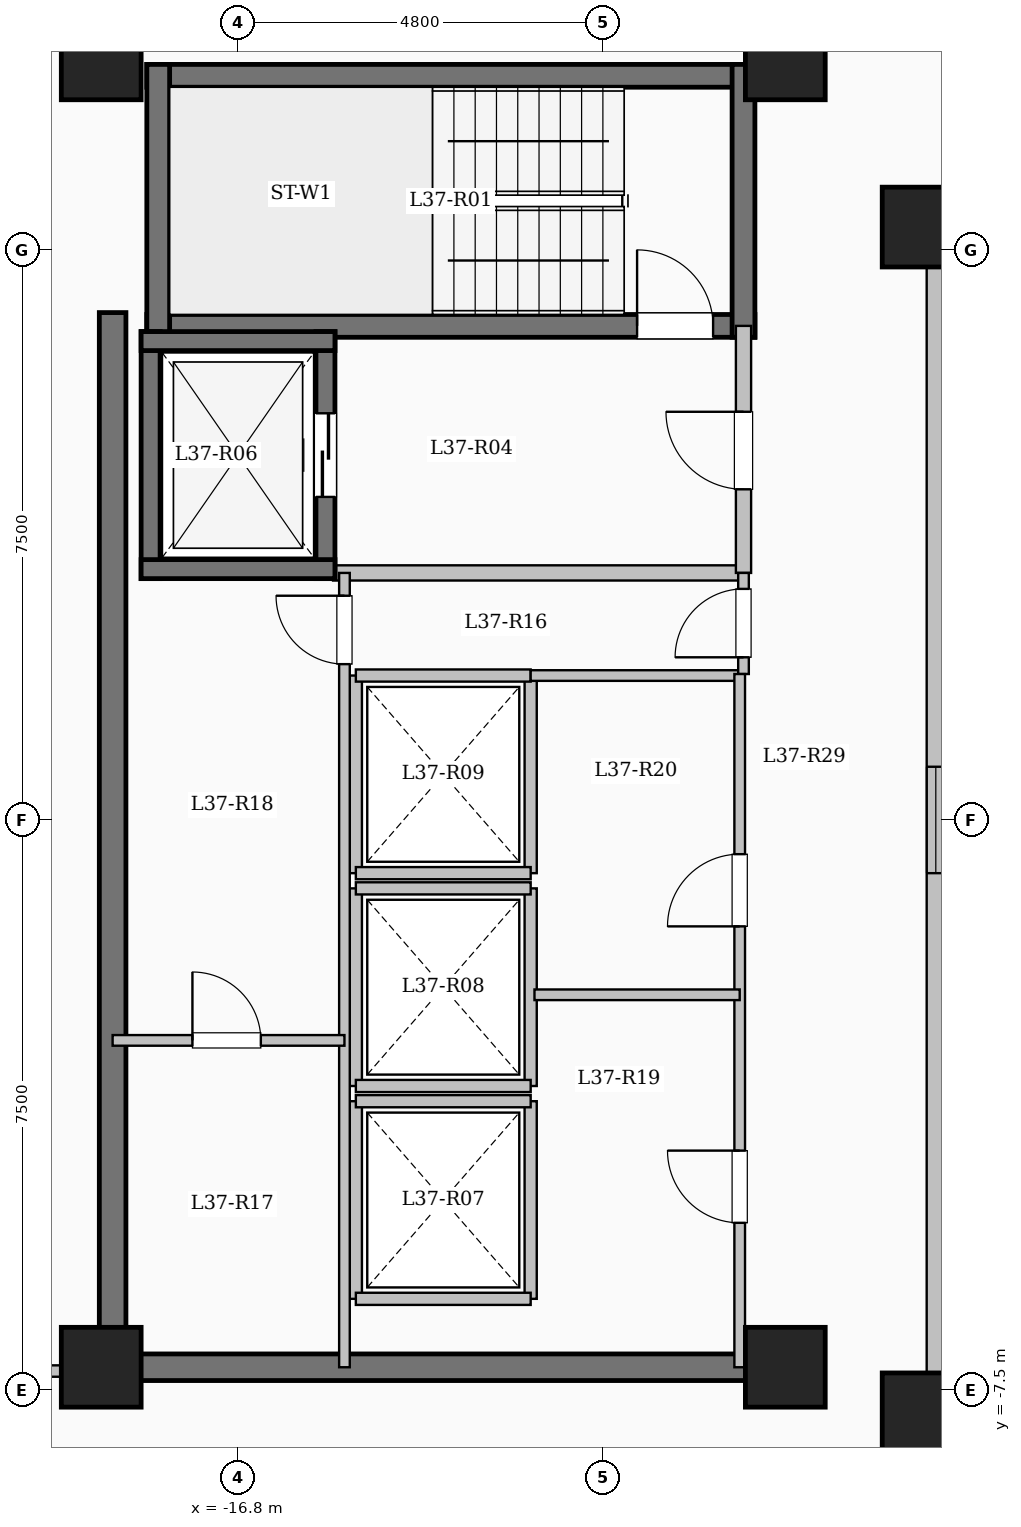
"""IFC4 building model, lengths in metres.
Left out: names, types, materials, properties, quantities, classifications, styles, units other than length and angle.
Written with IfcOpenShell. Run it as: python <this file> out.ifc"""

import sys

from ifc_helpers import new_model, si_unit, direction, frame, frame_2d, origin, origin_2d, place, context, subcontext, project, spatial, rectangle, extrude, element, fill, save


model = new_model("IFC4")
c1 = context("Model", 3, precision=1e-05, world=origin(), true_north=direction((0.0, 1.0)))
c2 = subcontext(c1, "Body", "Model", "MODEL_VIEW")
j1 = project(units=[si_unit("LENGTHUNIT", "METRE"), si_unit("PLANEANGLEUNIT", "RADIAN")], contexts=[c1])
p1 = place(None, origin())
s1 = spatial("IfcSite", under=j1, at=p1, CompositionType="ELEMENT")
p2 = place(p1, origin())
s2 = spatial("IfcBuilding", under=s1, at=p2, CompositionType="ELEMENT")
p3 = place(p2, frame((0.0, 0.0, 139.3)))
s3 = spatial("IfcBuildingStorey", under=s2, at=p3, CompositionType="ELEMENT", Elevation=139.3)
for number, where, z_axis, x_axis in (
    (1, (-7.8, -7.8, 0.0), (0.0, 0.0, 1.0), (1.0, 0.0, 0.0)),
    (2, (-7.8, 7.8, 0.0), (0.0, 0.0, 1.0), (1.0, 0.0, 0.0)),
    (3, (-9.6, -7.2, 0.0), (0.0, 0.0, 1.0), (1.0, 0.0, 0.0)),
    (4, (-9.6, 10.0, 0.0), (0.0, 0.0, 1.0), (1.0, 0.0, 0.0)),
    (5, (-18.6, -7.2, 0.0), (0.0, 0.0, 1.0), (1.0, 0.0, 0.0)),
    (6, (-18.6, 10.0, 0.0), (0.0, 0.0, 1.0), (1.0, 0.0, 0.0)),
):
    element("IfcColumn", number, at=place(p3, frame(where, z_axis=z_axis, x_axis=x_axis)), inside=s3, PredefinedType="COLUMN", context=c2, shape_type="SweptSolid", body=[
        extrude(rectangle(XDim=1.05, YDim=1.05, at=origin_2d()), origin(), (0.0, 0.0, 1.0), 3.35),
    ])
p4 = place(p3, frame((-7.62, -7.62, 0.0), z_axis=(0.0, 0.0, 1.0), x_axis=(1.0, 0.0, 0.0)))
e7 = element("IfcWall", 7, at=p4, inside=s3, PredefinedType="SOLIDWALL", context=c2, shape_type="SweptSolid", body=[
    extrude(rectangle(XDim=15.24, YDim=0.24, at=frame_2d((7.62, 0.0))), origin(), (0.0, 0.0, 1.0), 3.1),
])
p5 = place(p4, frame((6.92, 0.0, 0.95)))
e8 = element("IfcOpeningElement", 8, at=p5, cuts=e7, PredefinedType="OPENING", context=c2, shape_type="SweptSolid", body=[
    extrude(rectangle(XDim=1.4, YDim=1.5, at=frame_2d((0.7, 0.75))), frame((0.0, 0.13, 0.0), z_axis=(0.0, -1.0, 0.0), x_axis=(1.0, 0.0, 0.0)), (0.0, 0.0, 1.0), 0.26),
])
p6 = place(p3, frame((7.62, 7.62, 0.0), z_axis=(0.0, 0.0, 1.0), x_axis=(-1.0, 0.0, 0.0)))
e9 = element("IfcWall", 9, at=p6, inside=s3, PredefinedType="SOLIDWALL", context=c2, shape_type="SweptSolid", body=[
    extrude(rectangle(XDim=15.24, YDim=0.24, at=frame_2d((7.62, 0.0))), origin(), (0.0, 0.0, 1.0), 3.1),
])
p7 = place(p6, frame((6.92, 0.0, 0.95)))
e10 = element("IfcOpeningElement", 10, at=p7, cuts=e9, PredefinedType="OPENING", context=c2, shape_type="SweptSolid", body=[
    extrude(rectangle(XDim=1.4, YDim=1.5, at=frame_2d((0.7, 0.75))), frame((0.0, 0.13, 0.0), z_axis=(0.0, -1.0, 0.0), x_axis=(1.0, 0.0, 0.0)), (0.0, 0.0, 1.0), 0.26),
])
p8 = place(p3, frame((-7.62, 7.62, 0.0), z_axis=(0.0, 0.0, 1.0), x_axis=(0.0, -1.0, 0.0)))
e11 = element("IfcWall", 11, at=p8, inside=s3, PredefinedType="SOLIDWALL", context=c2, shape_type="SweptSolid", body=[
    extrude(rectangle(XDim=15.24, YDim=0.24, at=frame_2d((7.62, 0.0))), origin(), (0.0, 0.0, 1.0), 3.1),
])
p9 = place(p8, frame((6.92, 0.0, 0.95)))
e12 = element("IfcOpeningElement", 12, at=p9, cuts=e11, PredefinedType="OPENING", context=c2, shape_type="SweptSolid", body=[
    extrude(rectangle(XDim=1.4, YDim=1.5, at=frame_2d((0.7, 0.75))), frame((0.0, 0.13, 0.0), z_axis=(0.0, -1.0, 0.0), x_axis=(1.0, 0.0, 0.0)), (0.0, 0.0, 1.0), 0.26),
])
p10 = place(p3, frame((-18.0, 9.79, 0.0), z_axis=(0.0, 0.0, 1.0), x_axis=(1.0, 0.0, 0.0)))
e13 = element("IfcWall", 13, at=p10, inside=s3, PredefinedType="SHEAR", context=c2, shape_type="SweptSolid", body=[
    extrude(rectangle(XDim=8.0, YDim=0.3, at=frame_2d((4.0, 0.0))), origin(), (0.0, 0.0, 1.0), 3.35),
])
p11 = place(p3, frame((-18.0, 6.5, 0.0), z_axis=(0.0, 0.0, 1.0), x_axis=(1.0, 0.0, 0.0)))
e14 = element("IfcWall", 14, at=p11, inside=s3, PredefinedType="SHEAR", context=c2, shape_type="SweptSolid", body=[
    extrude(rectangle(XDim=8.0, YDim=0.3, at=frame_2d((4.0, 0.0))), origin(), (0.0, 0.0, 1.0), 3.35),
])
p12 = place(p11, frame((6.45, 0.0, 0.0)))
e15 = element("IfcOpeningElement", 15, at=p12, cuts=e14, PredefinedType="OPENING", context=c2, shape_type="SweptSolid", body=[
    extrude(rectangle(XDim=1.0, YDim=2.15, at=frame_2d((0.5, 1.075))), frame((0.0, 0.16, 0.0), z_axis=(0.0, -1.0, 0.0), x_axis=(1.0, 0.0, 0.0)), (0.0, 0.0, 1.0), 0.32),
])
for number, where, z_axis, x_axis in (
    (16, (-17.85, 6.35, 0.0), (0.0, 0.0, 1.0), (0.0, 1.0, 0.0)),
    (17, (-10.15, 6.35, 0.0), (0.0, 0.0, 1.0), (0.0, 1.0, 0.0)),
):
    element("IfcWall", number, at=place(p3, frame(where, z_axis=z_axis, x_axis=x_axis)), inside=s3, PredefinedType="SHEAR", context=c2, shape_type="SweptSolid", body=[
        extrude(rectangle(XDim=3.59, YDim=0.3, at=frame_2d((1.795, 0.0))), origin(), (0.0, 0.0, 1.0), 3.35),
    ])
p13 = place(p3, frame((-15.55, 3.25, 0.0), z_axis=(0.0, 0.0, 1.0), x_axis=(1.0, 0.0, 0.0)))
e18 = element("IfcWall", 18, at=p13, inside=s3, PredefinedType="SOLIDWALL", context=c2, shape_type="SweptSolid", body=[
    extrude(rectangle(XDim=5.4, YDim=0.2, at=frame_2d((2.7, 0.0))), origin(), (0.0, 0.0, 1.0), 3.1),
])
p14 = place(p3, frame((-10.15, 3.25, 0.0), z_axis=(0.0, 0.0, 1.0), x_axis=(0.0, 1.0, 0.0)))
e19 = element("IfcWall", 19, at=p14, inside=s3, PredefinedType="SOLIDWALL", context=c2, shape_type="SweptSolid", body=[
    extrude(rectangle(XDim=3.25, YDim=0.2, at=frame_2d((1.625, 0.0))), origin(), (0.0, 0.0, 1.0), 3.1),
])
p15 = place(p14, frame((1.1, 0.0, 0.0)))
e20 = element("IfcOpeningElement", 20, at=p15, cuts=e19, PredefinedType="OPENING", context=c2, shape_type="SweptSolid", body=[
    extrude(rectangle(XDim=1.02, YDim=2.15, at=frame_2d((0.51, 1.075))), frame((0.0, 0.11, 0.0), z_axis=(0.0, -1.0, 0.0), x_axis=(1.0, 0.0, 0.0)), (0.0, 0.0, 1.0), 0.22),
])
p16 = place(p3, frame((-17.95, 3.175, 0.0), z_axis=(0.0, 0.0, 1.0), x_axis=(0.0, 1.0, 0.0)))
e21 = element("IfcWall", 21, at=p16, inside=s3, PredefinedType="SHEAR", context=c2, shape_type="SweptSolid", body=[
    extrude(rectangle(XDim=3.25, YDim=0.25, at=frame_2d((1.625, 0.0))), origin(), (0.0, 0.0, 1.0), 3.35),
])
p17 = place(p3, frame((-15.65, 3.175, 0.0), z_axis=(0.0, 0.0, 1.0), x_axis=(0.0, 1.0, 0.0)))
e22 = element("IfcWall", 22, at=p17, inside=s3, PredefinedType="SHEAR", context=c2, shape_type="SweptSolid", body=[
    extrude(rectangle(XDim=3.25, YDim=0.25, at=frame_2d((1.625, 0.0))), origin(), (0.0, 0.0, 1.0), 3.35),
])
p18 = place(p17, frame((1.075, 0.0, 0.0)))
e23 = element("IfcOpeningElement", 23, at=p18, cuts=e22, PredefinedType="OPENING", context=c2, shape_type="SweptSolid", body=[
    extrude(rectangle(XDim=1.1, YDim=2.15, at=frame_2d((0.55, 1.075))), frame((0.0, 0.135, 0.0), z_axis=(0.0, -1.0, 0.0), x_axis=(1.0, 0.0, 0.0)), (0.0, 0.0, 1.0), 0.27),
])
for number, where, z_axis, x_axis in (
    (24, (-18.075, 3.3, 0.0), (0.0, 0.0, 1.0), (1.0, 0.0, 0.0)),
    (25, (-18.075, 6.3, 0.0), (0.0, 0.0, 1.0), (1.0, 0.0, 0.0)),
):
    element("IfcWall", number, at=place(p3, frame(where, z_axis=z_axis, x_axis=x_axis)), inside=s3, PredefinedType="SHEAR", context=c2, shape_type="SweptSolid", body=[
        extrude(rectangle(XDim=2.55, YDim=0.25, at=frame_2d((1.275, 0.0))), origin(), (0.0, 0.0, 1.0), 3.35),
    ])
for number, where, z_axis, x_axis in (
    (26, (-15.25, -6.3, 0.0), (0.0, 0.0, 1.0), (0.0, 1.0, 0.0)),
    (27, (-12.95, -6.3, 0.0), (0.0, 0.0, 1.0), (0.0, 1.0, 0.0)),
):
    element("IfcWall", number, at=place(p3, frame(where, z_axis=z_axis, x_axis=x_axis)), inside=s3, PredefinedType="SOLIDWALL", context=c2, shape_type="SweptSolid", body=[
        extrude(rectangle(XDim=2.6, YDim=0.16, at=frame_2d((1.3, 0.0))), origin(), (0.0, 0.0, 1.0), 3.1),
    ])
for number, where, z_axis, x_axis in (
    (28, (-15.25, -6.3, 0.0), (0.0, 0.0, 1.0), (1.0, 0.0, 0.0)),
    (29, (-15.25, -3.7, 0.0), (0.0, 0.0, 1.0), (1.0, 0.0, 0.0)),
):
    element("IfcWall", number, at=place(p3, frame(where, z_axis=z_axis, x_axis=x_axis)), inside=s3, PredefinedType="SOLIDWALL", context=c2, shape_type="SweptSolid", body=[
        extrude(rectangle(XDim=2.3, YDim=0.16, at=frame_2d((1.15, 0.0))), origin(), (0.0, 0.0, 1.0), 3.1),
    ])
for number, where, z_axis, x_axis in (
    (30, (-15.25, -3.5, 0.0), (0.0, 0.0, 1.0), (0.0, 1.0, 0.0)),
    (31, (-12.95, -3.5, 0.0), (0.0, 0.0, 1.0), (0.0, 1.0, 0.0)),
):
    element("IfcWall", number, at=place(p3, frame(where, z_axis=z_axis, x_axis=x_axis)), inside=s3, PredefinedType="SOLIDWALL", context=c2, shape_type="SweptSolid", body=[
        extrude(rectangle(XDim=2.6, YDim=0.16, at=frame_2d((1.3, 0.0))), origin(), (0.0, 0.0, 1.0), 3.1),
    ])
for number, where, z_axis, x_axis in (
    (32, (-15.25, -3.5, 0.0), (0.0, 0.0, 1.0), (1.0, 0.0, 0.0)),
    (33, (-15.25, -0.9, 0.0), (0.0, 0.0, 1.0), (1.0, 0.0, 0.0)),
):
    element("IfcWall", number, at=place(p3, frame(where, z_axis=z_axis, x_axis=x_axis)), inside=s3, PredefinedType="SOLIDWALL", context=c2, shape_type="SweptSolid", body=[
        extrude(rectangle(XDim=2.3, YDim=0.16, at=frame_2d((1.15, 0.0))), origin(), (0.0, 0.0, 1.0), 3.1),
    ])
for number, where, z_axis, x_axis in (
    (34, (-15.25, -0.7, 0.0), (0.0, 0.0, 1.0), (0.0, 1.0, 0.0)),
    (35, (-12.95, -0.7, 0.0), (0.0, 0.0, 1.0), (0.0, 1.0, 0.0)),
):
    element("IfcWall", number, at=place(p3, frame(where, z_axis=z_axis, x_axis=x_axis)), inside=s3, PredefinedType="SOLIDWALL", context=c2, shape_type="SweptSolid", body=[
        extrude(rectangle(XDim=2.6, YDim=0.16, at=frame_2d((1.3, 0.0))), origin(), (0.0, 0.0, 1.0), 3.1),
    ])
for number, where, z_axis, x_axis in (
    (36, (-15.25, -0.7, 0.0), (0.0, 0.0, 1.0), (1.0, 0.0, 0.0)),
    (37, (-15.25, 1.9, 0.0), (0.0, 0.0, 1.0), (1.0, 0.0, 0.0)),
):
    element("IfcWall", number, at=place(p3, frame(where, z_axis=z_axis, x_axis=x_axis)), inside=s3, PredefinedType="SOLIDWALL", context=c2, shape_type="SweptSolid", body=[
        extrude(rectangle(XDim=2.3, YDim=0.16, at=frame_2d((1.15, 0.0))), origin(), (0.0, 0.0, 1.0), 3.1),
    ])
p19 = place(p3, frame((-18.45, -7.375, 0.0), z_axis=(0.0, 0.0, 1.0), x_axis=(0.0, 1.0, 0.0)))
e38 = element("IfcWall", 38, at=p19, inside=s3, PredefinedType="SHEAR", context=c2, shape_type="SweptSolid", body=[
    extrude(rectangle(XDim=14.05, YDim=0.35, at=frame_2d((7.025, 0.0))), origin(), (0.0, 0.0, 1.0), 3.35),
])
p20 = place(p3, frame((-18.625, -7.2, 0.0), z_axis=(0.0, 0.0, 1.0), x_axis=(1.0, 0.0, 0.0)))
e39 = element("IfcWall", 39, at=p20, inside=s3, PredefinedType="SHEAR", context=c2, shape_type="SweptSolid", body=[
    extrude(rectangle(XDim=8.55, YDim=0.35, at=frame_2d((4.275, 0.0))), origin(), (0.0, 0.0, 1.0), 3.35),
])
p21 = place(p3, frame((-12.95, 1.9, 0.0), z_axis=(0.0, 0.0, 1.0), x_axis=(1.0, 0.0, 0.0)))
e40 = element("IfcWall", 40, at=p21, inside=s3, PredefinedType="PARTITIONING", context=c2, shape_type="SweptSolid", body=[
    extrude(rectangle(XDim=2.8, YDim=0.14, at=frame_2d((1.4, 0.0))), origin(), (0.0, 0.0, 1.0), 3.1),
])
p22 = place(p3, frame((-10.15, 1.92, 0.0), z_axis=(0.0, 0.0, 1.0), x_axis=(0.0, 1.0, 0.0)))
e41 = element("IfcWall", 41, at=p22, inside=s3, PredefinedType="PARTITIONING", context=c2, shape_type="SweptSolid", body=[
    extrude(rectangle(XDim=1.33, YDim=0.14, at=frame_2d((0.665, 0.0))), origin(), (0.0, 0.0, 1.0), 3.1),
])
p23 = place(p22, frame((0.22, 0.0, 0.0)))
e42 = element("IfcOpeningElement", 42, at=p23, cuts=e41, PredefinedType="OPENING", context=c2, shape_type="SweptSolid", body=[
    extrude(rectangle(XDim=0.9, YDim=2.08, at=frame_2d((0.45, 1.04))), frame((0.0, 0.08, 0.0), z_axis=(0.0, -1.0, 0.0), x_axis=(1.0, 0.0, 0.0)), (0.0, 0.0, 1.0), 0.16),
])
p24 = place(p3, frame((-15.4, -7.2, 0.0), z_axis=(0.0, 0.0, 1.0), x_axis=(0.0, 1.0, 0.0)))
e43 = element("IfcWall", 43, at=p24, inside=s3, PredefinedType="PARTITIONING", context=c2, shape_type="SweptSolid", body=[
    extrude(rectangle(XDim=10.45, YDim=0.14, at=frame_2d((5.225, 0.0))), origin(), (0.0, 0.0, 1.0), 3.1),
])
p25 = place(p24, frame((9.25, 0.0, 0.0)))
e44 = element("IfcOpeningElement", 44, at=p25, cuts=e43, PredefinedType="OPENING", context=c2, shape_type="SweptSolid", body=[
    extrude(rectangle(XDim=0.9, YDim=2.08, at=frame_2d((0.45, 1.04))), frame((0.0, 0.08, 0.0), z_axis=(0.0, -1.0, 0.0), x_axis=(1.0, 0.0, 0.0)), (0.0, 0.0, 1.0), 0.16),
])
p26 = place(p3, frame((-18.45, -2.9, 0.0), z_axis=(0.0, 0.0, 1.0), x_axis=(1.0, 0.0, 0.0)))
e45 = element("IfcWall", 45, at=p26, inside=s3, PredefinedType="PARTITIONING", context=c2, shape_type="SweptSolid", body=[
    extrude(rectangle(XDim=3.05, YDim=0.14, at=frame_2d((1.525, 0.0))), origin(), (0.0, 0.0, 1.0), 3.1),
])
p27 = place(p26, frame((1.05, 0.0, 0.0)))
e46 = element("IfcOpeningElement", 46, at=p27, cuts=e45, PredefinedType="OPENING", context=c2, shape_type="SweptSolid", body=[
    extrude(rectangle(XDim=0.9, YDim=2.08, at=frame_2d((0.45, 1.04))), frame((0.0, 0.08, 0.0), z_axis=(0.0, -1.0, 0.0), x_axis=(1.0, 0.0, 0.0)), (0.0, 0.0, 1.0), 0.16),
])
p28 = place(p3, frame((-10.2, -7.2, 0.0), z_axis=(0.0, 0.0, 1.0), x_axis=(0.0, 1.0, 0.0)))
e47 = element("IfcWall", 47, at=p28, inside=s3, PredefinedType="PARTITIONING", context=c2, shape_type="SweptSolid", body=[
    extrude(rectangle(XDim=9.12, YDim=0.14, at=frame_2d((4.56, 0.0))), origin(), (0.0, 0.0, 1.0), 3.1),
])
p29 = place(p28, frame((1.9, 0.0, 0.0)))
e48 = element("IfcOpeningElement", 48, at=p29, cuts=e47, PredefinedType="OPENING", context=c2, shape_type="SweptSolid", body=[
    extrude(rectangle(XDim=0.95, YDim=2.12, at=frame_2d((0.475, 1.06))), frame((0.0, 0.08, 0.0), z_axis=(0.0, -1.0, 0.0), x_axis=(1.0, 0.0, 0.0)), (0.0, 0.0, 1.0), 0.16),
])
p30 = place(p28, frame((5.8, 0.0, 0.0)))
e49 = element("IfcOpeningElement", 49, at=p30, cuts=e47, PredefinedType="OPENING", context=c2, shape_type="SweptSolid", body=[
    extrude(rectangle(XDim=0.95, YDim=2.12, at=frame_2d((0.475, 1.06))), frame((0.0, 0.08, 0.0), z_axis=(0.0, -1.0, 0.0), x_axis=(1.0, 0.0, 0.0)), (0.0, 0.0, 1.0), 0.16),
])
p31 = place(p3, frame((-12.9, -2.3, 0.0), z_axis=(0.0, 0.0, 1.0), x_axis=(1.0, 0.0, 0.0)))
e50 = element("IfcWall", 50, at=p31, inside=s3, PredefinedType="PARTITIONING", context=c2, shape_type="SweptSolid", body=[
    extrude(rectangle(XDim=2.7, YDim=0.14, at=frame_2d((1.35, 0.0))), origin(), (0.0, 0.0, 1.0), 3.1),
])
p32 = place(p3, frame((-25.08, -7.25, 0.0), z_axis=(0.0, 0.0, 1.0), x_axis=(1.0, 0.0, 0.0)))
e51 = element("IfcWall", 51, at=p32, inside=s3, PredefinedType="PARTITIONING", context=c2, shape_type="SweptSolid", body=[
    extrude(rectangle(XDim=6.63, YDim=0.15, at=frame_2d((3.315, 0.0))), origin(), (0.0, 0.0, 1.0), 3.1),
])
p33 = place(p32, frame((3.58, 0.0, 0.0)))
e52 = element("IfcOpeningElement", 52, at=p33, cuts=e51, PredefinedType="OPENING", context=c2, shape_type="SweptSolid", body=[
    extrude(rectangle(XDim=1.08, YDim=2.15, at=frame_2d((0.54, 1.075))), frame((0.0, 0.085, 0.0), z_axis=(0.0, -1.0, 0.0), x_axis=(1.0, 0.0, 0.0)), (0.0, 0.0, 1.0), 0.17),
])
p34 = place(p9, origin())
e53 = element("IfcWindow", 53, at=p34, inside=s3, PartitioningType="SINGLE_PANEL", PredefinedType="WINDOW", context=c2, shape_type="SweptSolid", body=[
    extrude(rectangle(XDim=1.4, YDim=1.5, at=frame_2d((0.7, 0.75))), frame((0.0, 0.03, 0.0), z_axis=(0.0, -1.0, 0.0), x_axis=(1.0, 0.0, 0.0)), (0.0, 0.0, 1.0), 0.06),
])
fill(e12, e53)
p35 = place(p12, origin())
e54 = element("IfcDoor", 54, at=p35, inside=s3, OperationType="SINGLE_SWING_LEFT", PredefinedType="DOOR", context=c2, shape_type="SweptSolid", body=[
    extrude(rectangle(XDim=1.0, YDim=2.15, at=frame_2d((0.5, 1.075))), frame((0.0, 0.025, 0.0), z_axis=(0.0, -1.0, 0.0), x_axis=(1.0, 0.0, 0.0)), (0.0, 0.0, 1.0), 0.05),
])
fill(e15, e54)
p36 = place(p15, origin())
e55 = element("IfcDoor", 55, at=p36, inside=s3, OperationType="SINGLE_SWING_RIGHT", PredefinedType="DOOR", context=c2, shape_type="SweptSolid", body=[
    extrude(rectangle(XDim=1.02, YDim=2.15, at=frame_2d((0.51, 1.075))), frame((0.0, 0.025, 0.0), z_axis=(0.0, -1.0, 0.0), x_axis=(1.0, 0.0, 0.0)), (0.0, 0.0, 1.0), 0.05),
])
fill(e20, e55)
p37 = place(p18, origin())
e56 = element("IfcDoor", 56, at=p37, inside=s3, OperationType="SLIDING_TO_LEFT", PredefinedType="DOOR", context=c2, shape_type="SweptSolid", body=[
    extrude(rectangle(XDim=1.1, YDim=2.15, at=frame_2d((0.55, 1.075))), frame((0.0, 0.025, 0.0), z_axis=(0.0, -1.0, 0.0), x_axis=(1.0, 0.0, 0.0)), (0.0, 0.0, 1.0), 0.05),
])
fill(e23, e56)
p38 = place(p23, origin())
e57 = element("IfcDoor", 57, at=p38, inside=s3, OperationType="SINGLE_SWING_LEFT", PredefinedType="DOOR", context=c2, shape_type="SweptSolid", body=[
    extrude(rectangle(XDim=0.9, YDim=2.08, at=frame_2d((0.45, 1.04))), frame((0.0, 0.025, 0.0), z_axis=(0.0, -1.0, 0.0), x_axis=(1.0, 0.0, 0.0)), (0.0, 0.0, 1.0), 0.05),
])
fill(e42, e57)
p39 = place(p25, origin())
e58 = element("IfcDoor", 58, at=p39, inside=s3, OperationType="SINGLE_SWING_RIGHT", PredefinedType="DOOR", context=c2, shape_type="SweptSolid", body=[
    extrude(rectangle(XDim=0.9, YDim=2.08, at=frame_2d((0.45, 1.04))), frame((0.0, 0.025, 0.0), z_axis=(0.0, -1.0, 0.0), x_axis=(1.0, 0.0, 0.0)), (0.0, 0.0, 1.0), 0.05),
])
fill(e44, e58)
p40 = place(p27, origin())
e59 = element("IfcDoor", 59, at=p40, inside=s3, OperationType="SINGLE_SWING_LEFT", PredefinedType="DOOR", context=c2, shape_type="SweptSolid", body=[
    extrude(rectangle(XDim=0.9, YDim=2.08, at=frame_2d((0.45, 1.04))), frame((0.0, 0.025, 0.0), z_axis=(0.0, -1.0, 0.0), x_axis=(1.0, 0.0, 0.0)), (0.0, 0.0, 1.0), 0.05),
])
fill(e46, e59)
p41 = place(p29, origin())
e60 = element("IfcDoor", 60, at=p41, inside=s3, OperationType="SINGLE_SWING_RIGHT", PredefinedType="DOOR", context=c2, shape_type="SweptSolid", body=[
    extrude(rectangle(XDim=0.95, YDim=2.12, at=frame_2d((0.475, 1.06))), frame((0.0, 0.025, 0.0), z_axis=(0.0, -1.0, 0.0), x_axis=(1.0, 0.0, 0.0)), (0.0, 0.0, 1.0), 0.05),
])
fill(e48, e60)
p42 = place(p30, origin())
e61 = element("IfcDoor", 61, at=p42, inside=s3, OperationType="SINGLE_SWING_LEFT", PredefinedType="DOOR", context=c2, shape_type="SweptSolid", body=[
    extrude(rectangle(XDim=0.95, YDim=2.12, at=frame_2d((0.475, 1.06))), frame((0.0, 0.025, 0.0), z_axis=(0.0, -1.0, 0.0), x_axis=(1.0, 0.0, 0.0)), (0.0, 0.0, 1.0), 0.05),
])
fill(e49, e61)
save(model, sys.argv[1])
